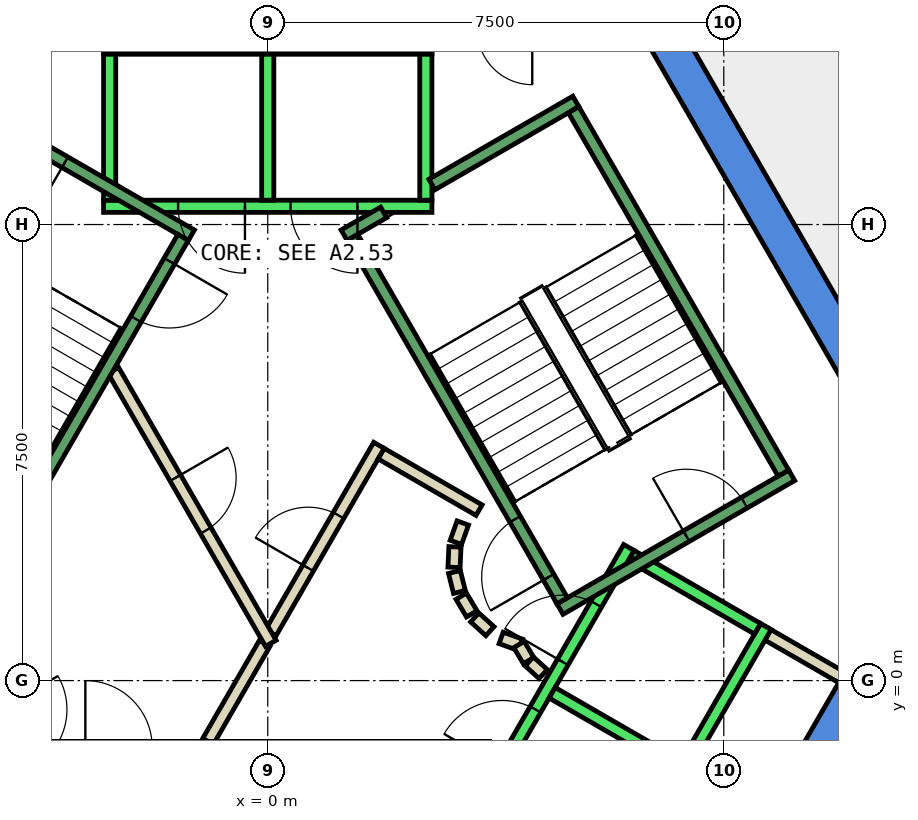
"""IFC4 building model, lengths in metres.
Left out: names, types, materials, properties, quantities, classifications, styles, units other than length and angle.
Written with IfcOpenShell. Run it as: python <this file> out.ifc"""

import sys

from ifc_helpers import new_model, si_unit, direction, frame, frame_2d, origin, place, context, subcontext, project, spatial, polyline, rectangle, outline, extrude, element, fill, save


model = new_model("IFC4")
c1 = context("Model", 3, precision=1e-05, world=origin(), true_north=direction((0.0, 1.0)))
c2 = subcontext(c1, "Body", "Model", "MODEL_VIEW")
j1 = project(units=[si_unit("LENGTHUNIT", "METRE"), si_unit("PLANEANGLEUNIT", "RADIAN")], contexts=[c1])
p1 = place(None, origin())
s1 = spatial("IfcSite", under=j1, at=p1, CompositionType="ELEMENT")
p2 = place(p1, origin())
s2 = spatial("IfcBuilding", under=s1, at=p2, CompositionType="ELEMENT")
p3 = place(p2, frame((0.0, 0.0, 255.8)))
s3 = spatial("IfcBuildingStorey", under=s2, at=p3, CompositionType="ELEMENT", Elevation=255.8)
p4 = place(p3, frame((0.0, 0.0, -0.34)))
e1 = element("IfcWall", 1, at=p4, inside=s3, PredefinedType="SHEAR", context=c2, shape_type="SweptSolid", body=[
    extrude(outline(polyline([(6.786, 10.747), (6.266, 10.447), (10.854, 2.5), (11.547, 2.5), (6.786, 10.747)])), origin(), (0.0, 0.0, 1.0), 3.6),
])
p5 = place(p3, frame((0.0, 0.0, -0.34)))
e2 = element("IfcWall", 2, at=p5, inside=s3, PredefinedType="SHEAR", context=c2, shape_type="SweptSolid", body=[
    extrude(outline(polyline([(5.774, -7.5), (11.547, 2.5), (10.854, 2.5), (5.427, -6.9), (5.774, -7.5)])), origin(), (0.0, 0.0, 1.0), 3.6),
])
p6 = place(p3, frame((8.181, 13.532, 0.0), z_axis=(0.0, 0.0, 1.0), x_axis=(0.51625987265, -0.856431984393, 0.0)))
e3 = element("IfcWall", 3, at=p6, inside=s3, PredefinedType="PARTITIONING", context=c2, shape_type="SweptSolid", body=[
    extrude(rectangle(XDim=4.312, YDim=0.2, at=frame_2d((2.156, 0.0))), origin(), (0.0, 0.0, 1.0), 3.26),
])
p7 = place(p6, frame((1.706, 0.0, 0.0)))
e4 = element("IfcOpeningElement", 4, at=p7, cuts=e3, PredefinedType="OPENING", context=c2, shape_type="SweptSolid", body=[
    extrude(rectangle(XDim=1.0, YDim=2.1, at=frame_2d((0.5, 1.05))), frame((0.0, 0.11, 0.0), z_axis=(0.0, -1.0, 0.0), x_axis=(1.0, 0.0, 0.0)), (0.0, 0.0, 1.0), 0.22),
])
p8 = place(p3, frame((8.141, 0.801, 0.0), z_axis=(0.0, 0.0, 1.0), x_axis=(0.866434738017, -0.499290341141, 0.0)))
e5 = element("IfcWall", 5, at=p8, inside=s3, PredefinedType="PARTITIONING", context=c2, shape_type="SweptSolid", body=[
    extrude(rectangle(XDim=1.5, YDim=0.2, at=frame_2d((0.75, 0.0))), origin(), (0.0, 0.0, 1.0), 3.26),
])
p9 = place(p3, frame((9.285, -4.818, 0.0), z_axis=(0.0, 0.0, 1.0), x_axis=(0.499962569651, 0.866047013128, 0.0)))
e6 = element("IfcWall", 6, at=p9, inside=s3, PredefinedType="PARTITIONING", context=c2, shape_type="SweptSolid", body=[
    extrude(rectangle(XDim=7.334, YDim=0.2, at=frame_2d((3.667, 0.0))), origin(), (0.0, 0.0, 1.0), 3.26),
])
p10 = place(p3, frame((-0.982, -1.0, 0.0), z_axis=(0.0, 0.0, 1.0), x_axis=(0.50024047865, 0.865886518847, 0.0)))
e7 = element("IfcWall", 7, at=p10, inside=s3, PredefinedType="PARTITIONING", context=c2, shape_type="SweptSolid", body=[
    extrude(rectangle(XDim=1.863, YDim=0.2, at=frame_2d((0.931, 0.0))), origin(), (0.0, 0.0, 1.0), 3.26),
])
p11 = place(p3, frame((0.05, 0.787, 0.0), z_axis=(0.0, 0.0, 1.0), x_axis=(0.499954076797, 0.866051915934, 0.0)))
e8 = element("IfcWall", 8, at=p11, inside=s3, PredefinedType="PARTITIONING", context=c2, shape_type="SweptSolid", body=[
    extrude(rectangle(XDim=3.558, YDim=0.2, at=frame_2d((1.779, 0.0))), origin(), (0.0, 0.0, 1.0), 3.26),
])
p12 = place(p11, frame((1.229, 0.0, 0.0)))
e9 = element("IfcOpeningElement", 9, at=p12, cuts=e8, PredefinedType="OPENING", context=c2, shape_type="SweptSolid", body=[
    extrude(rectangle(XDim=1.0, YDim=2.1, at=frame_2d((0.5, 1.05))), frame((0.0, 0.11, 0.0), z_axis=(0.0, -1.0, 0.0), x_axis=(1.0, 0.0, 0.0)), (0.0, 0.0, 1.0), 0.22),
])
p13 = place(p3, frame((1.866, 3.732, 0.0), z_axis=(0.0, 0.0, 1.0), x_axis=(0.866043361281, -0.499968895414, 0.0)))
e10 = element("IfcWall", 10, at=p13, inside=s3, PredefinedType="PARTITIONING", context=c2, shape_type="SweptSolid", body=[
    extrude(rectangle(XDim=1.858, YDim=0.2, at=frame_2d((0.929, 0.0))), origin(), (0.0, 0.0, 1.0), 3.26),
])
p14 = place(p3, frame((3.208, 2.592, 0.0), z_axis=(0.0, 0.0, 1.0), x_axis=(-0.337388820924, -0.941365382578, 0.0)))
e11 = element("IfcWall", 11, at=p14, inside=s3, PredefinedType="PARTITIONING", context=c2, shape_type="SweptSolid", body=[
    extrude(rectangle(XDim=0.338, YDim=0.2, at=frame_2d((0.169, 0.0))), origin(), (0.0, 0.0, 1.0), 3.26),
])
p15 = place(p3, frame((3.079, 2.199, 0.0), z_axis=(0.0, 0.0, 1.0), x_axis=(-0.047771483479, -0.998858290933, 0.0)))
e12 = element("IfcWall", 12, at=p15, inside=s3, PredefinedType="PARTITIONING", context=c2, shape_type="SweptSolid", body=[
    extrude(rectangle(XDim=0.337, YDim=0.2, at=frame_2d((0.169, 0.0))), origin(), (0.0, 0.0, 1.0), 3.26),
])
p16 = place(p3, frame((3.07, 1.786, 0.0), z_axis=(0.0, 0.0, 1.0), x_axis=(0.242705583207, -0.970099994784, 0.0)))
e13 = element("IfcWall", 13, at=p16, inside=s3, PredefinedType="PARTITIONING", context=c2, shape_type="SweptSolid", body=[
    extrude(rectangle(XDim=0.338, YDim=0.2, at=frame_2d((0.169, 0.0))), origin(), (0.0, 0.0, 1.0), 3.26),
])
for number, where, z_axis, x_axis in (
    (14, (3.182, 1.388, 0.0), (0.0, 0.0, 1.0), (0.512, -0.859, 0.0)),
    (15, (3.404, 1.039, 0.0), (0.0, 0.0, 1.0), (0.74, -0.672, 0.0)),
):
    element("IfcWall", number, at=place(p3, frame(where, z_axis=z_axis, x_axis=x_axis)), inside=s3, PredefinedType="PARTITIONING", context=c2, shape_type="SweptSolid", body=[
        extrude(rectangle(XDim=0.338, YDim=0.2, at=frame_2d((0.169, 0.0))), origin(), (0.0, 0.0, 1.0), 3.26),
    ])
p17 = place(p3, frame((3.838, 0.702, 0.0), z_axis=(0.0, 0.0, 1.0), x_axis=(0.941035081519, -0.338308993895, 0.0)))
e16 = element("IfcWall", 16, at=p17, inside=s3, PredefinedType="PARTITIONING", context=c2, shape_type="SweptSolid", body=[
    extrude(rectangle(XDim=0.337, YDim=0.2, at=frame_2d((0.168, 0.0))), origin(), (0.0, 0.0, 1.0), 3.26),
])
p18 = place(p3, frame((4.132, 0.593, 0.0), z_axis=(0.0, 0.0, 1.0), x_axis=(0.513561617048, -0.858052717201, 0.0)))
e17 = element("IfcWall", 17, at=p18, inside=s3, PredefinedType="PARTITIONING", context=c2, shape_type="SweptSolid", body=[
    extrude(rectangle(XDim=0.308, YDim=0.2, at=frame_2d((0.154, 0.0))), origin(), (0.0, 0.0, 1.0), 3.26),
])
p19 = place(p3, frame((4.301, 0.315, 0.0), z_axis=(0.0, 0.0, 1.0), x_axis=(0.741798017506, -0.670623367639, 0.0)))
e18 = element("IfcWall", 18, at=p19, inside=s3, PredefinedType="PARTITIONING", context=c2, shape_type="SweptSolid", body=[
    extrude(rectangle(XDim=0.309, YDim=0.2, at=frame_2d((0.154, 0.0))), origin(), (0.0, 0.0, 1.0), 3.26),
])
p20 = place(p3, frame((-2.54, 5.1, 0.0), z_axis=(0.0, 0.0, 1.0), x_axis=(0.499925051871, -0.866068670783, 0.0)))
e19 = element("IfcWall", 19, at=p20, inside=s3, PredefinedType="PARTITIONING", context=c2, shape_type="SweptSolid", body=[
    extrude(rectangle(XDim=5.181, YDim=0.2, at=frame_2d((2.59, 0.0))), origin(), (0.0, 0.0, 1.0), 3.26),
])
p21 = place(p20, frame((2.04, 0.0, 0.0)))
e20 = element("IfcOpeningElement", 20, at=p21, cuts=e19, PredefinedType="OPENING", context=c2, shape_type="SweptSolid", body=[
    extrude(rectangle(XDim=1.0, YDim=2.1, at=frame_2d((0.5, 1.05))), frame((0.0, 0.11, 0.0), z_axis=(0.0, -1.0, 0.0), x_axis=(1.0, 0.0, 0.0)), (0.0, 0.0, 1.0), 0.22),
])
p22 = place(p3, frame((2.7, 7.8, 0.0), z_axis=(0.0, 0.0, 1.0), x_axis=(-1.0, 0.0, 0.0)))
e21 = element("IfcWall", 21, at=p22, inside=s3, PredefinedType="STANDARD", context=c2, shape_type="SweptSolid", body=[
    extrude(rectangle(XDim=5.4, YDim=0.2, at=frame_2d((2.7, 0.0))), origin(), (0.0, 0.0, 1.0), 3.26),
])
p23 = place(p22, frame((1.225, 0.0, 0.0)))
e22 = element("IfcOpeningElement", 22, at=p23, cuts=e21, PredefinedType="OPENING", context=c2, shape_type="SweptSolid", body=[
    extrude(rectangle(XDim=1.1, YDim=2.1, at=frame_2d((0.55, 1.05))), frame((0.0, 0.11, 0.0), z_axis=(0.0, -1.0, 0.0), x_axis=(1.0, 0.0, 0.0)), (0.0, 0.0, 1.0), 0.22),
])
p24 = place(p22, frame((3.075, 0.0, 0.0)))
e23 = element("IfcOpeningElement", 23, at=p24, cuts=e21, PredefinedType="OPENING", context=c2, shape_type="SweptSolid", body=[
    extrude(rectangle(XDim=1.1, YDim=2.1, at=frame_2d((0.55, 1.05))), frame((0.0, 0.11, 0.0), z_axis=(0.0, -1.0, 0.0), x_axis=(1.0, 0.0, 0.0)), (0.0, 0.0, 1.0), 0.22),
])
p25 = place(p3, frame((2.7, 10.4, 0.0), z_axis=(0.0, 0.0, 1.0), x_axis=(-1.0, 0.0, 0.0)))
e24 = element("IfcWall", 24, at=p25, inside=s3, PredefinedType="STANDARD", context=c2, shape_type="SweptSolid", body=[
    extrude(rectangle(XDim=5.4, YDim=0.2, at=frame_2d((2.7, 0.0))), origin(), (0.0, 0.0, 1.0), 3.26),
])
for number, where, z_axis, x_axis in (
    (25, (2.6, 7.9, 0.0), (0.0, 0.0, 1.0), (0.0, 1.0, 0.0)),
    (26, (0.0, 7.9, 0.0), (0.0, 0.0, 1.0), (0.0, 1.0, 0.0)),
    (27, (-2.6, 7.9, 0.0), (0.0, 0.0, 1.0), (0.0, 1.0, 0.0)),
):
    element("IfcWall", number, at=place(p3, frame(where, z_axis=z_axis, x_axis=x_axis)), inside=s3, PredefinedType="STANDARD", context=c2, shape_type="SweptSolid", body=[
        extrude(rectangle(XDim=2.4, YDim=0.2, at=frame_2d((1.2, 0.0))), origin(), (0.0, 0.0, 1.0), 3.26),
    ])
p26 = place(p3, frame((-5.94, 2.188, 0.0), z_axis=(0.0, 0.0, 1.0), x_axis=(0.500034260056, -0.866005622828, 0.0)))
e28 = element("IfcWall", 28, at=p26, inside=s3, PredefinedType="STANDARD", context=c2, shape_type="SweptSolid", body=[
    extrude(rectangle(XDim=5.399, YDim=0.2, at=frame_2d((2.7, 0.0))), origin(), (0.0, 0.0, 1.0), 3.26),
])
p27 = place(p26, frame((3.075, 0.0, 0.0)))
e29 = element("IfcOpeningElement", 29, at=p27, cuts=e28, PredefinedType="OPENING", context=c2, shape_type="SweptSolid", body=[
    extrude(rectangle(XDim=1.1, YDim=2.1, at=frame_2d((0.55, 1.05))), frame((0.0, 0.11, 0.0), z_axis=(0.0, -1.0, 0.0), x_axis=(1.0, 0.0, 0.0)), (0.0, 0.0, 1.0), 0.22),
])
p28 = place(p26, frame((1.225, 0.0, 0.0)))
e30 = element("IfcOpeningElement", 30, at=p28, cuts=e28, PredefinedType="OPENING", context=c2, shape_type="SweptSolid", body=[
    extrude(rectangle(XDim=1.1, YDim=2.1, at=frame_2d((0.55, 1.05))), frame((0.0, 0.11, 0.0), z_axis=(0.0, -1.0, 0.0), x_axis=(1.0, 0.0, 0.0)), (0.0, 0.0, 1.0), 0.22),
])
p29 = place(p3, frame((3.24, -2.488, 0.0), z_axis=(0.0, 0.0, 1.0), x_axis=(0.500034260056, 0.866005622828, 0.0)))
e31 = element("IfcWall", 31, at=p29, inside=s3, PredefinedType="STANDARD", context=c2, shape_type="SweptSolid", body=[
    extrude(rectangle(XDim=5.399, YDim=0.2, at=frame_2d((2.7, 0.0))), origin(), (0.0, 0.0, 1.0), 3.26),
])
p30 = place(p29, frame((3.225, 0.0, 0.0)))
e32 = element("IfcOpeningElement", 32, at=p30, cuts=e31, PredefinedType="OPENING", context=c2, shape_type="SweptSolid", body=[
    extrude(rectangle(XDim=1.1, YDim=2.1, at=frame_2d((0.55, 1.05))), frame((0.0, 0.11, 0.0), z_axis=(0.0, -1.0, 0.0), x_axis=(1.0, 0.0, 0.0)), (0.0, 0.0, 1.0), 0.22),
])
p31 = place(p29, frame((1.225, 0.0, 0.0)))
e33 = element("IfcOpeningElement", 33, at=p31, cuts=e31, PredefinedType="OPENING", context=c2, shape_type="SweptSolid", body=[
    extrude(rectangle(XDim=1.1, YDim=2.1, at=frame_2d((0.55, 1.05))), frame((0.0, 0.11, 0.0), z_axis=(0.0, -1.0, 0.0), x_axis=(1.0, 0.0, 0.0)), (0.0, 0.0, 1.0), 0.22),
])
p32 = place(p3, frame((5.492, -3.788, 0.0), z_axis=(0.0, 0.0, 1.0), x_axis=(0.500034260056, 0.866005622828, 0.0)))
e34 = element("IfcWall", 34, at=p32, inside=s3, PredefinedType="STANDARD", context=c2, shape_type="SweptSolid", body=[
    extrude(rectangle(XDim=5.399, YDim=0.2, at=frame_2d((2.7, 0.0))), origin(), (0.0, 0.0, 1.0), 3.26),
])
for number, where, z_axis, x_axis in (
    (35, (4.677, -0.2, 0.0), (0.0, 0.0, 1.0), (0.866, -0.5, 0.0)),
    (36, (5.977, 2.052, 0.0), (0.0, 0.0, 1.0), (0.866, -0.5, 0.0)),
):
    element("IfcWall", number, at=place(p3, frame(where, z_axis=z_axis, x_axis=x_axis)), inside=s3, PredefinedType="STANDARD", context=c2, shape_type="SweptSolid", body=[
        extrude(rectangle(XDim=2.399, YDim=0.2, at=frame_2d((1.2, 0.0))), origin(), (0.0, 0.0, 1.0), 3.26),
    ])
p33 = place(p3, frame((4.806, 1.176, 0.0), z_axis=(0.0, 0.0, 1.0), x_axis=(0.866059941101, 0.499940174841, 0.0)))
e37 = element("IfcWall", 37, at=p33, inside=s3, PredefinedType="STANDARD", context=c2, shape_type="SweptSolid", body=[
    extrude(rectangle(XDim=4.4, YDim=0.2, at=frame_2d((2.2, 0.0))), origin(), (0.0, 0.0, 1.0), 3.26),
])
p34 = place(p33, frame((2.4, 0.0, 0.0)))
e38 = element("IfcOpeningElement", 38, at=p34, cuts=e37, PredefinedType="OPENING", context=c2, shape_type="SweptSolid", body=[
    extrude(rectangle(XDim=1.1, YDim=2.2, at=frame_2d((0.55, 1.1))), frame((0.0, 0.11, 0.0), z_axis=(0.0, -1.0, 0.0), x_axis=(1.0, 0.0, 0.0)), (0.0, 0.0, 1.0), 0.22),
])
p35 = place(p3, frame((2.7, 8.158, 0.0), z_axis=(0.0, 0.0, 1.0), x_axis=(0.86611865017, 0.499838457731, 0.0)))
e39 = element("IfcWall", 39, at=p35, inside=s3, PredefinedType="STANDARD", context=c2, shape_type="SweptSolid", body=[
    extrude(rectangle(XDim=2.733, YDim=0.2, at=frame_2d((1.366, 0.0))), origin(), (0.0, 0.0, 1.0), 3.26),
])
p36 = place(p3, frame((1.256, 7.324, 0.0), z_axis=(0.0, 0.0, 1.0), x_axis=(0.865915093549, 0.500191014278, 0.0)))
e40 = element("IfcWall", 40, at=p36, inside=s3, PredefinedType="STANDARD", context=c2, shape_type="SweptSolid", body=[
    extrude(rectangle(XDim=0.752, YDim=0.2, at=frame_2d((0.376, 0.0))), origin(), (0.0, 0.0, 1.0), 3.26),
])
p37 = place(p3, frame((4.843, 1.312, 0.0), z_axis=(0.0, 0.0, 1.0), x_axis=(-0.499963383562, 0.866046543262, 0.0)))
e41 = element("IfcWall", 41, at=p37, inside=s3, PredefinedType="STANDARD", context=c2, shape_type="SweptSolid", body=[
    extrude(rectangle(XDim=6.9, YDim=0.2, at=frame_2d((3.45, 0.0))), origin(), (0.0, 0.0, 1.0), 3.26),
])
p38 = place(p37, frame((0.45, 0.0, 0.0)))
e42 = element("IfcOpeningElement", 42, at=p38, cuts=e41, PredefinedType="OPENING", context=c2, shape_type="SweptSolid", body=[
    extrude(rectangle(XDim=1.1, YDim=2.2, at=frame_2d((0.55, 1.1))), frame((0.0, 0.11, 0.0), z_axis=(0.0, -1.0, 0.0), x_axis=(1.0, 0.0, 0.0)), (0.0, 0.0, 1.0), 0.22),
])
p39 = place(p3, frame((8.48, 3.412, 0.0), z_axis=(0.0, 0.0, 1.0), x_axis=(-0.499978703459, 0.866037698999, 0.0)))
e43 = element("IfcWall", 43, at=p39, inside=s3, PredefinedType="STANDARD", context=c2, shape_type="SweptSolid", body=[
    extrude(rectangle(XDim=6.9, YDim=0.2, at=frame_2d((3.45, 0.0))), origin(), (0.0, 0.0, 1.0), 3.26),
])
p40 = place(p3, frame((-1.256, 7.324, 0.0), z_axis=(0.0, 0.0, 1.0), x_axis=(-0.866046073146, 0.499964197906, 0.0)))
e44 = element("IfcWall", 44, at=p40, inside=s3, PredefinedType="STANDARD", context=c2, shape_type="SweptSolid", body=[
    extrude(rectangle(XDim=4.4, YDim=0.2, at=frame_2d((2.2, 0.0))), origin(), (0.0, 0.0, 1.0), 3.26),
])
p41 = place(p40, frame((2.4, 0.0, 0.0)))
e45 = element("IfcOpeningElement", 45, at=p41, cuts=e44, PredefinedType="OPENING", context=c2, shape_type="SweptSolid", body=[
    extrude(rectangle(XDim=1.1, YDim=2.2, at=frame_2d((0.55, 1.1))), frame((0.0, 0.11, 0.0), z_axis=(0.0, -1.0, 0.0), x_axis=(1.0, 0.0, 0.0)), (0.0, 0.0, 1.0), 0.22),
])
p42 = place(p3, frame((-1.393, 7.288, 0.0), z_axis=(0.0, 0.0, 1.0), x_axis=(-0.499963383562, -0.866046543262, 0.0)))
e46 = element("IfcWall", 46, at=p42, inside=s3, PredefinedType="STANDARD", context=c2, shape_type="SweptSolid", body=[
    extrude(rectangle(XDim=6.9, YDim=0.2, at=frame_2d((3.45, 0.0))), origin(), (0.0, 0.0, 1.0), 3.26),
])
p43 = place(p42, frame((0.45, 0.0, 0.0)))
e47 = element("IfcOpeningElement", 47, at=p43, cuts=e46, PredefinedType="OPENING", context=c2, shape_type="SweptSolid", body=[
    extrude(rectangle(XDim=1.1, YDim=2.2, at=frame_2d((0.55, 1.1))), frame((0.0, 0.11, 0.0), z_axis=(0.0, -1.0, 0.0), x_axis=(1.0, 0.0, 0.0)), (0.0, 0.0, 1.0), 0.22),
])
p44 = place(p12, origin())
e48 = element("IfcDoor", 48, at=p44, inside=s3, OperationType="SINGLE_SWING_RIGHT", PredefinedType="DOOR", context=c2, shape_type="SweptSolid", body=[
    extrude(rectangle(XDim=1.0, YDim=2.1, at=frame_2d((0.5, 1.05))), frame((0.0, 0.025, 0.0), z_axis=(0.0, -1.0, 0.0), x_axis=(1.0, 0.0, 0.0)), (0.0, 0.0, 1.0), 0.05),
])
fill(e9, e48)
p45 = place(p21, origin())
e49 = element("IfcDoor", 49, at=p45, inside=s3, OperationType="SINGLE_SWING_RIGHT", PredefinedType="DOOR", context=c2, shape_type="SweptSolid", body=[
    extrude(rectangle(XDim=1.0, YDim=2.1, at=frame_2d((0.5, 1.05))), frame((0.0, 0.025, 0.0), z_axis=(0.0, -1.0, 0.0), x_axis=(1.0, 0.0, 0.0)), (0.0, 0.0, 1.0), 0.05),
])
fill(e20, e49)
p46 = place(p23, origin())
e50 = element("IfcDoor", 50, at=p46, inside=s3, OperationType="SLIDING_TO_LEFT", PredefinedType="DOOR", context=c2, shape_type="SweptSolid", body=[
    extrude(rectangle(XDim=1.1, YDim=2.1, at=frame_2d((0.55, 1.05))), frame((0.0, 0.025, 0.0), z_axis=(0.0, -1.0, 0.0), x_axis=(1.0, 0.0, 0.0)), (0.0, 0.0, 1.0), 0.05),
])
fill(e22, e50)
p47 = place(p24, origin())
e51 = element("IfcDoor", 51, at=p47, inside=s3, OperationType="SLIDING_TO_LEFT", PredefinedType="DOOR", context=c2, shape_type="SweptSolid", body=[
    extrude(rectangle(XDim=1.1, YDim=2.1, at=frame_2d((0.55, 1.05))), frame((0.0, 0.025, 0.0), z_axis=(0.0, -1.0, 0.0), x_axis=(1.0, 0.0, 0.0)), (0.0, 0.0, 1.0), 0.05),
])
fill(e23, e51)
p48 = place(p30, origin())
e52 = element("IfcDoor", 52, at=p48, inside=s3, OperationType="SLIDING_TO_LEFT", PredefinedType="DOOR", context=c2, shape_type="SweptSolid", body=[
    extrude(rectangle(XDim=1.1, YDim=2.1, at=frame_2d((0.55, 1.05))), frame((0.0, 0.025, 0.0), z_axis=(0.0, -1.0, 0.0), x_axis=(1.0, 0.0, 0.0)), (0.0, 0.0, 1.0), 0.05),
])
fill(e32, e52)
p49 = place(p31, origin())
e53 = element("IfcDoor", 53, at=p49, inside=s3, OperationType="SLIDING_TO_LEFT", PredefinedType="DOOR", context=c2, shape_type="SweptSolid", body=[
    extrude(rectangle(XDim=1.1, YDim=2.1, at=frame_2d((0.55, 1.05))), frame((0.0, 0.025, 0.0), z_axis=(0.0, -1.0, 0.0), x_axis=(1.0, 0.0, 0.0)), (0.0, 0.0, 1.0), 0.05),
])
fill(e33, e53)
p50 = place(p38, origin())
e54 = element("IfcDoor", 54, at=p50, inside=s3, OperationType="SINGLE_SWING_LEFT", PredefinedType="DOOR", context=c2, shape_type="SweptSolid", body=[
    extrude(rectangle(XDim=1.1, YDim=2.2, at=frame_2d((0.55, 1.1))), frame((0.0, 0.025, 0.0), z_axis=(0.0, -1.0, 0.0), x_axis=(1.0, 0.0, 0.0)), (0.0, 0.0, 1.0), 0.05),
])
fill(e42, e54)
p51 = place(p34, origin())
e55 = element("IfcDoor", 55, at=p51, inside=s3, OperationType="SINGLE_SWING_LEFT", PredefinedType="DOOR", context=c2, shape_type="SweptSolid", body=[
    extrude(rectangle(XDim=1.1, YDim=2.2, at=frame_2d((0.55, 1.1))), frame((0.0, 0.025, 0.0), z_axis=(0.0, -1.0, 0.0), x_axis=(1.0, 0.0, 0.0)), (0.0, 0.0, 1.0), 0.05),
])
fill(e38, e55)
p52 = place(p43, origin())
e56 = element("IfcDoor", 56, at=p52, inside=s3, OperationType="SINGLE_SWING_LEFT", PredefinedType="DOOR", context=c2, shape_type="SweptSolid", body=[
    extrude(rectangle(XDim=1.1, YDim=2.2, at=frame_2d((0.55, 1.1))), frame((0.0, 0.025, 0.0), z_axis=(0.0, -1.0, 0.0), x_axis=(1.0, 0.0, 0.0)), (0.0, 0.0, 1.0), 0.05),
])
fill(e47, e56)
p53 = place(p41, origin())
e57 = element("IfcDoor", 57, at=p53, inside=s3, OperationType="SINGLE_SWING_LEFT", PredefinedType="DOOR", context=c2, shape_type="SweptSolid", body=[
    extrude(rectangle(XDim=1.1, YDim=2.2, at=frame_2d((0.55, 1.1))), frame((0.0, 0.025, 0.0), z_axis=(0.0, -1.0, 0.0), x_axis=(1.0, 0.0, 0.0)), (0.0, 0.0, 1.0), 0.05),
])
fill(e45, e57)
save(model, sys.argv[1])
